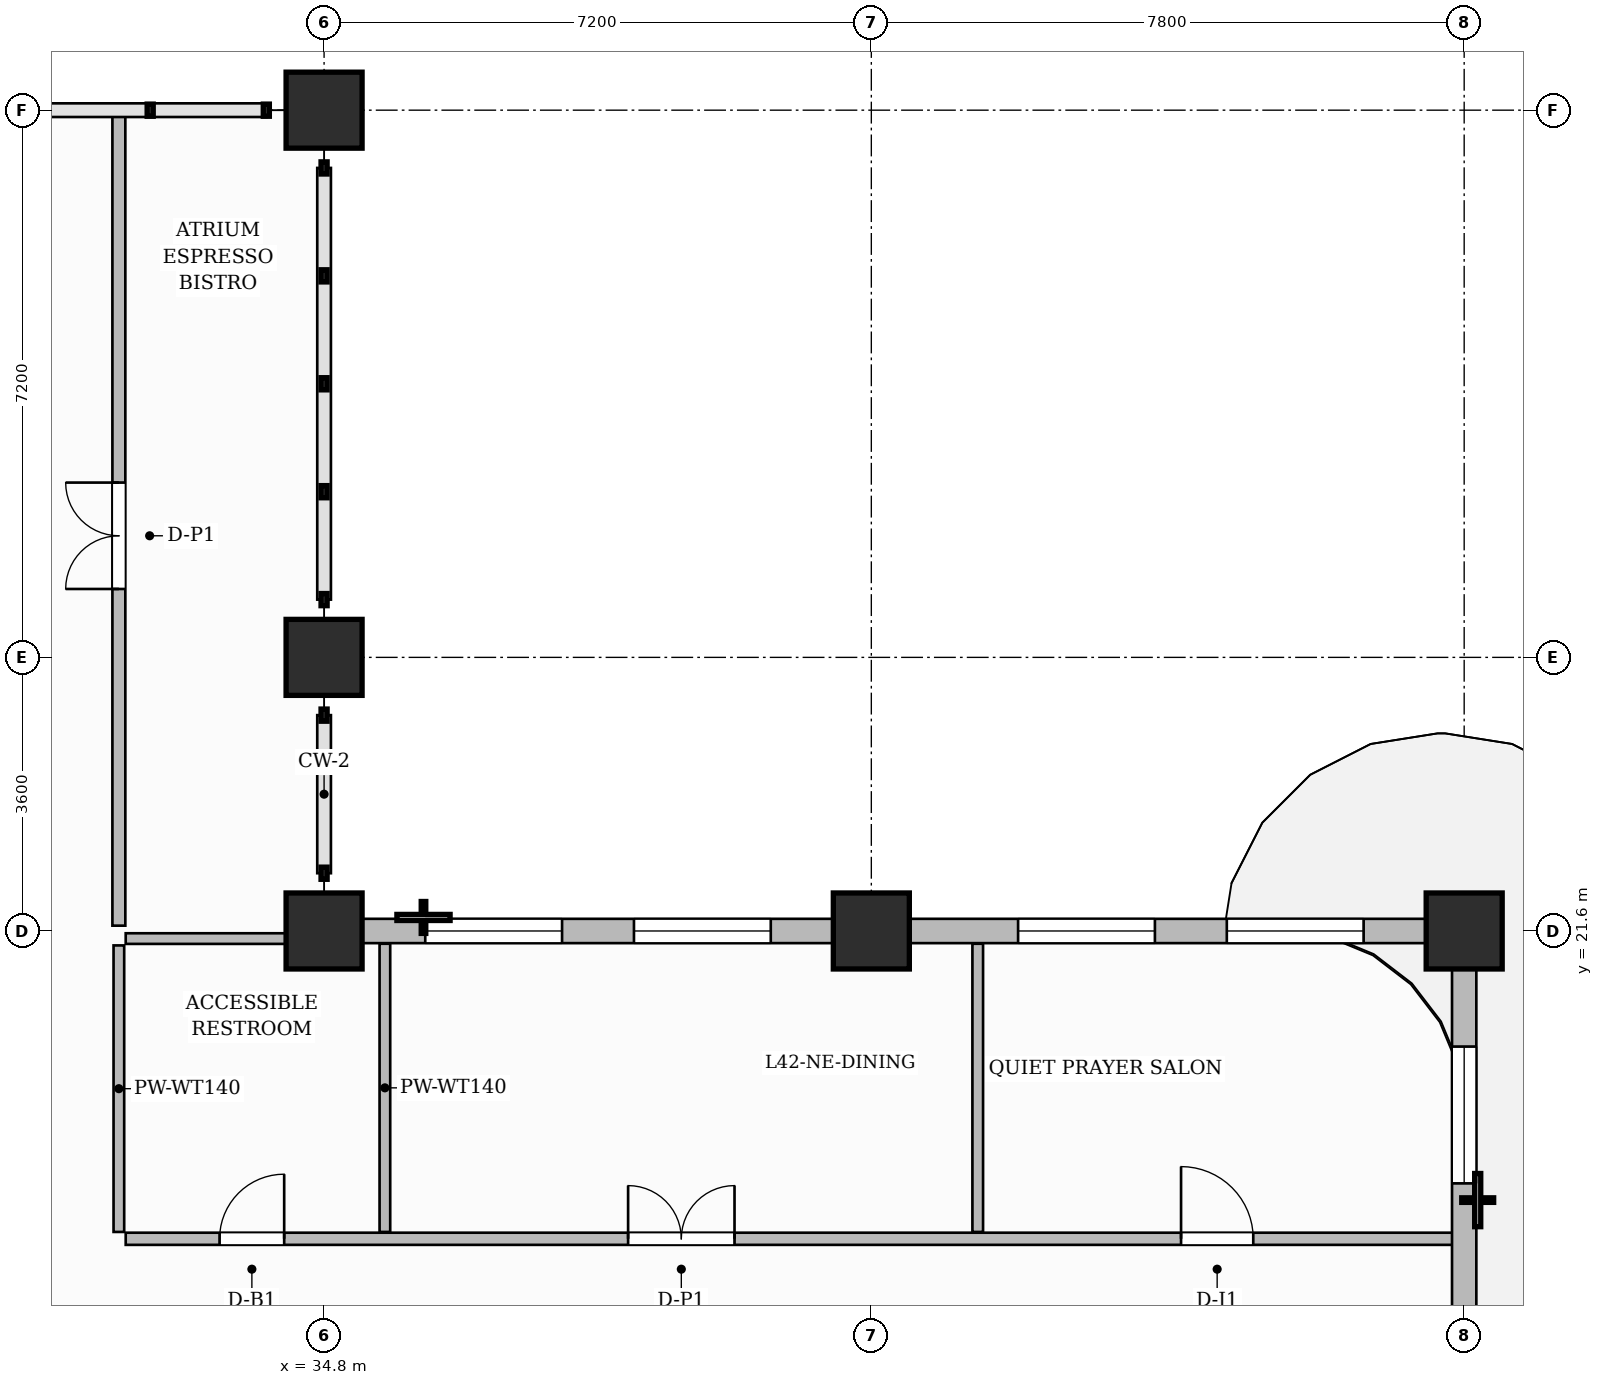
"""IFC4 building model, lengths in metres.
Left out: names, types, materials, properties, quantities, classifications, styles, units other than length and angle.
Written with IfcOpenShell. Run it as: python <this file> out.ifc"""

import sys

from ifc_helpers import new_model, si_unit, direction, frame, frame_2d, origin, origin_2d, place, context, subcontext, project, spatial, rectangle, extrude, source, transform, mapped, element, fill, save


model = new_model("IFC4")
c1 = context("Model", 3, precision=1e-05, world=origin(), true_north=direction((0.0, 1.0)))
c2 = subcontext(c1, "Body", "Model", "MODEL_VIEW")
j1 = project(units=[si_unit("LENGTHUNIT", "METRE"), si_unit("PLANEANGLEUNIT", "RADIAN")], contexts=[c1])
p1 = place(None, origin())
s1 = spatial("IfcSite", under=j1, at=p1, CompositionType="ELEMENT")
p2 = place(p1, origin())
s2 = spatial("IfcBuilding", under=s1, at=p2, CompositionType="ELEMENT")
p3 = place(p2, frame((0.0, 0.0, 169.55)))
s3 = spatial("IfcBuildingStorey", under=s2, at=p3, CompositionType="ELEMENT", Elevation=169.55)
m1 = source(origin(), c2, "Body", "SweptSolid", [
    extrude(rectangle(XDim=1.0, YDim=1.0, at=origin_2d()), origin(), (0.0, 0.0, 1.0), 3.85),
])
for number, where, z_axis, x_axis in (
    (1, (34.8, 21.6, 0.0), (0.0, 0.0, 1.0), (1.0, 0.0, 0.0)),
    (2, (34.8, 25.2, 0.0), (0.0, 0.0, 1.0), (1.0, 0.0, 0.0)),
    (3, (34.8, 32.4, 0.0), (0.0, 0.0, 1.0), (1.0, 0.0, 0.0)),
    (4, (42.0, 21.6, 0.0), (0.0, 0.0, 1.0), (1.0, 0.0, 0.0)),
    (5, (49.8, 21.6, 0.0), (0.0, 0.0, 1.0), (1.0, 0.0, 0.0)),
):
    element("IfcColumn", number, at=place(p3, frame(where, z_axis=z_axis, x_axis=x_axis)), inside=s3, PredefinedType="COLUMN", context=c2, shape_type="MappedRepresentation", body=[
        mapped(m1, transform((0.0, 0.0, 0.0), scale=1.0)),
    ])
p4 = place(p3, frame((32.19, 17.55, 0.0), z_axis=(0.0, 0.0, 1.0), x_axis=(1.0, 0.0, 0.0)))
e6 = element("IfcWall", 6, at=p4, inside=s3, PredefinedType="PARTITIONING", context=c2, shape_type="SweptSolid", body=[
    extrude(rectangle(XDim=17.47, YDim=0.16, at=frame_2d((8.735, 0.0))), origin(), (0.0, 0.0, 1.0), 3.6),
])
p5 = place(p4, frame((1.235, 0.0, 0.0)))
e7 = element("IfcOpeningElement", 7, at=p5, cuts=e6, PredefinedType="OPENING", context=c2, shape_type="SweptSolid", body=[
    extrude(rectangle(XDim=0.85, YDim=2.1, at=frame_2d((0.425, 1.05))), frame((0.0, 0.09, 0.0), z_axis=(0.0, -1.0, 0.0), x_axis=(1.0, 0.0, 0.0)), (0.0, 0.0, 1.0), 0.18),
])
p6 = place(p4, frame((6.61, 0.0, 0.0)))
e8 = element("IfcOpeningElement", 8, at=p6, cuts=e6, PredefinedType="OPENING", context=c2, shape_type="SweptSolid", body=[
    extrude(rectangle(XDim=1.4, YDim=2.35, at=frame_2d((0.7, 1.175))), frame((0.0, 0.09, 0.0), z_axis=(0.0, -1.0, 0.0), x_axis=(1.0, 0.0, 0.0)), (0.0, 0.0, 1.0), 0.18),
])
p7 = place(p4, frame((13.885, 0.0, 0.0)))
e9 = element("IfcOpeningElement", 9, at=p7, cuts=e6, PredefinedType="OPENING", context=c2, shape_type="SweptSolid", body=[
    extrude(rectangle(XDim=0.95, YDim=2.15, at=frame_2d((0.475, 1.075))), frame((0.0, 0.09, 0.0), z_axis=(0.0, -1.0, 0.0), x_axis=(1.0, 0.0, 0.0)), (0.0, 0.0, 1.0), 0.18),
])
p8 = place(p3, frame((32.1, 17.64, 0.0), z_axis=(0.0, 0.0, 1.0), x_axis=(0.0, 1.0, 0.0)))
e10 = element("IfcWall", 10, at=p8, inside=s3, PredefinedType="PARTITIONING", context=c2, shape_type="SweptSolid", body=[
    extrude(rectangle(XDim=3.77, YDim=0.14, at=frame_2d((1.885, 0.0))), origin(), (0.0, 0.0, 1.0), 3.6),
])
for number, where, z_axis, x_axis in (
    (11, (35.6, 17.64, 0.0), (0.0, 0.0, 1.0), (0.0, 1.0, 0.0)),
    (12, (43.4, 17.64, 0.0), (0.0, 0.0, 1.0), (0.0, 1.0, 0.0)),
):
    element("IfcWall", number, at=place(p3, frame(where, z_axis=z_axis, x_axis=x_axis)), inside=s3, PredefinedType="PARTITIONING", context=c2, shape_type="SweptSolid", body=[
        extrude(rectangle(XDim=3.792, YDim=0.14, at=frame_2d((1.896, 0.0))), origin(), (0.0, 0.0, 1.0), 3.6),
    ])
p9 = place(p3, frame((32.19, 21.5, 0.0), z_axis=(0.0, 0.0, 1.0), x_axis=(1.0, 0.0, 0.0)))
e13 = element("IfcWall", 13, at=p9, inside=s3, PredefinedType="PARTITIONING", context=c2, shape_type="SweptSolid", body=[
    extrude(rectangle(XDim=2.42, YDim=0.14, at=frame_2d((1.21, 0.0))), origin(), (0.0, 0.0, 1.0), 3.085),
])
p10 = place(p3, frame((32.1, 21.67, 0.0), z_axis=(0.0, 0.0, 1.0), x_axis=(0.0, 1.0, 0.0)))
e14 = element("IfcWall", 14, at=p10, inside=s3, PredefinedType="PARTITIONING", context=c2, shape_type="SweptSolid", body=[
    extrude(rectangle(XDim=10.702, YDim=0.17, at=frame_2d((5.351, 0.0))), origin(), (0.0, 0.0, 1.0), 3.6),
])
p11 = place(p10, frame((4.43, 0.0, 0.0)))
e15 = element("IfcOpeningElement", 15, at=p11, cuts=e14, PredefinedType="OPENING", context=c2, shape_type="SweptSolid", body=[
    extrude(rectangle(XDim=1.4, YDim=2.35, at=frame_2d((0.7, 1.175))), frame((0.0, 0.095, 0.0), z_axis=(0.0, -1.0, 0.0), x_axis=(1.0, 0.0, 0.0)), (0.0, 0.0, 1.0), 0.19),
])
p12 = place(p3, frame((49.8, 14.62, 0.0), z_axis=(0.0, 0.0, 1.0), x_axis=(0.0, 1.0, 0.0)))
e16 = element("IfcWall", 16, at=p12, inside=s3, PredefinedType="SOLIDWALL", context=c2, shape_type="SweptSolid", body=[
    extrude(rectangle(XDim=6.93, YDim=0.32, at=frame_2d((3.465, 0.0))), origin(), (0.0, 0.0, 1.0), 3.085),
])
p13 = place(p12, frame((0.42, 0.0, 0.0)))
e17 = element("IfcOpeningElement", 17, at=p13, cuts=e16, PredefinedType="OPENING", context=c2, shape_type="SweptSolid", body=[
    extrude(rectangle(XDim=1.2, YDim=2.2, at=frame_2d((0.6, 1.1))), frame((0.0, 0.17, 0.0), z_axis=(0.0, -1.0, 0.0), x_axis=(1.0, 0.0, 0.0)), (0.0, 0.0, 1.0), 0.34),
])
p14 = place(p12, frame((3.659, 0.0, 0.8)))
e18 = element("IfcOpeningElement", 18, at=p14, cuts=e16, PredefinedType="OPENING", context=c2, shape_type="SweptSolid", body=[
    extrude(rectangle(XDim=1.8, YDim=1.85, at=frame_2d((0.9, 0.925))), frame((0.0, 0.17, 0.0), z_axis=(0.0, -1.0, 0.0), x_axis=(1.0, 0.0, 0.0)), (0.0, 0.0, 1.0), 0.34),
])
p15 = place(p3, frame((34.8, 21.6, 0.0), z_axis=(0.0, 0.0, 1.0), x_axis=(1.0, 0.0, 0.0)))
e19 = element("IfcWall", 19, at=p15, inside=s3, PredefinedType="SOLIDWALL", context=c2, shape_type="SweptSolid", body=[
    extrude(rectangle(XDim=15.0, YDim=0.32, at=frame_2d((7.5, 0.0))), origin(), (0.0, 0.0, 1.0), 3.085),
])
p16 = place(p15, frame((1.331, 0.0, 0.8)))
e20 = element("IfcOpeningElement", 20, at=p16, cuts=e19, PredefinedType="OPENING", context=c2, shape_type="SweptSolid", body=[
    extrude(rectangle(XDim=1.8, YDim=1.85, at=frame_2d((0.9, 0.925))), frame((0.0, 0.17, 0.0), z_axis=(0.0, -1.0, 0.0), x_axis=(1.0, 0.0, 0.0)), (0.0, 0.0, 1.0), 0.34),
])
p17 = place(p15, frame((4.077, 0.0, 0.8)))
e21 = element("IfcOpeningElement", 21, at=p17, cuts=e19, PredefinedType="OPENING", context=c2, shape_type="SweptSolid", body=[
    extrude(rectangle(XDim=1.8, YDim=1.85, at=frame_2d((0.9, 0.925))), frame((0.0, 0.17, 0.0), z_axis=(0.0, -1.0, 0.0), x_axis=(1.0, 0.0, 0.0)), (0.0, 0.0, 1.0), 0.34),
])
p18 = place(p15, frame((9.131, 0.0, 0.8)))
e22 = element("IfcOpeningElement", 22, at=p18, cuts=e19, PredefinedType="OPENING", context=c2, shape_type="SweptSolid", body=[
    extrude(rectangle(XDim=1.8, YDim=1.85, at=frame_2d((0.9, 0.925))), frame((0.0, 0.17, 0.0), z_axis=(0.0, -1.0, 0.0), x_axis=(1.0, 0.0, 0.0)), (0.0, 0.0, 1.0), 0.34),
])
p19 = place(p15, frame((11.877, 0.0, 0.8)))
e23 = element("IfcOpeningElement", 23, at=p19, cuts=e19, PredefinedType="OPENING", context=c2, shape_type="SweptSolid", body=[
    extrude(rectangle(XDim=1.8, YDim=1.85, at=frame_2d((0.9, 0.925))), frame((0.0, 0.17, 0.0), z_axis=(0.0, -1.0, 0.0), x_axis=(1.0, 0.0, 0.0)), (0.0, 0.0, 1.0), 0.34),
])
m2 = source(origin(), c2, "Body", "SweptSolid", [
    extrude(rectangle(XDim=0.85, YDim=2.1, at=frame_2d((0.425, 1.05))), frame((0.0, 0.025, 0.0), z_axis=(0.0, -1.0, 0.0), x_axis=(1.0, 0.0, 0.0)), (0.0, 0.0, 1.0), 0.05),
])
p20 = place(p5, origin())
e24 = element("IfcDoor", 24, at=p20, inside=s3, OperationType="SINGLE_SWING_RIGHT", PredefinedType="DOOR", context=c2, shape_type="MappedRepresentation", body=[
    mapped(m2, transform((0.0, 0.0, 0.0), scale=1.0)),
])
fill(e7, e24)
m3 = source(origin(), c2, "Body", "SweptSolid", [
    extrude(rectangle(XDim=1.4, YDim=2.35, at=frame_2d((0.7, 1.175))), frame((0.0, 0.025, 0.0), z_axis=(0.0, -1.0, 0.0), x_axis=(1.0, 0.0, 0.0)), (0.0, 0.0, 1.0), 0.05),
])
p21 = place(p6, origin())
e25 = element("IfcDoor", 25, at=p21, inside=s3, OperationType="DOUBLE_DOOR_SINGLE_SWING", PredefinedType="DOOR", context=c2, shape_type="MappedRepresentation", body=[
    mapped(m3, transform((0.0, 0.0, 0.0), scale=1.0)),
])
fill(e8, e25)
m4 = source(origin(), c2, "Body", "SweptSolid", [
    extrude(rectangle(XDim=0.95, YDim=2.15, at=frame_2d((0.475, 1.075))), frame((0.0, 0.025, 0.0), z_axis=(0.0, -1.0, 0.0), x_axis=(1.0, 0.0, 0.0)), (0.0, 0.0, 1.0), 0.05),
])
p22 = place(p7, origin())
e26 = element("IfcDoor", 26, at=p22, inside=s3, OperationType="SINGLE_SWING_LEFT", PredefinedType="DOOR", context=c2, shape_type="MappedRepresentation", body=[
    mapped(m4, transform((0.0, 0.0, 0.0), scale=1.0)),
])
fill(e9, e26)
p23 = place(p11, origin())
e27 = element("IfcDoor", 27, at=p23, inside=s3, OperationType="DOUBLE_DOOR_SINGLE_SWING", PredefinedType="DOOR", context=c2, shape_type="MappedRepresentation", body=[
    mapped(m3, transform((0.0, 0.0, 0.0), scale=1.0)),
])
fill(e15, e27)
m5 = source(origin(), c2, "Body", "SweptSolid", [
    extrude(rectangle(XDim=1.8, YDim=1.85, at=frame_2d((0.9, 0.925))), frame((0.0, 0.03, 0.0), z_axis=(0.0, -1.0, 0.0), x_axis=(1.0, 0.0, 0.0)), (0.0, 0.0, 1.0), 0.06),
])
p24 = place(p14, origin())
e28 = element("IfcWindow", 28, at=p24, inside=s3, PartitioningType="DOUBLE_PANEL_VERTICAL", PredefinedType="WINDOW", context=c2, shape_type="MappedRepresentation", body=[
    mapped(m5, transform((0.0, 0.0, 0.0), scale=1.0)),
])
fill(e18, e28)
p25 = place(p16, origin())
e29 = element("IfcWindow", 29, at=p25, inside=s3, PartitioningType="DOUBLE_PANEL_VERTICAL", PredefinedType="WINDOW", context=c2, shape_type="MappedRepresentation", body=[
    mapped(m5, transform((0.0, 0.0, 0.0), scale=1.0)),
])
fill(e20, e29)
p26 = place(p17, origin())
e30 = element("IfcWindow", 30, at=p26, inside=s3, PartitioningType="DOUBLE_PANEL_VERTICAL", PredefinedType="WINDOW", context=c2, shape_type="MappedRepresentation", body=[
    mapped(m5, transform((0.0, 0.0, 0.0), scale=1.0)),
])
fill(e21, e30)
p27 = place(p18, origin())
e31 = element("IfcWindow", 31, at=p27, inside=s3, PartitioningType="DOUBLE_PANEL_VERTICAL", PredefinedType="WINDOW", context=c2, shape_type="MappedRepresentation", body=[
    mapped(m5, transform((0.0, 0.0, 0.0), scale=1.0)),
])
fill(e22, e31)
p28 = place(p19, origin())
e32 = element("IfcWindow", 32, at=p28, inside=s3, PartitioningType="DOUBLE_PANEL_VERTICAL", PredefinedType="WINDOW", context=c2, shape_type="MappedRepresentation", body=[
    mapped(m5, transform((0.0, 0.0, 0.0), scale=1.0)),
])
fill(e23, e32)
save(model, sys.argv[1])
